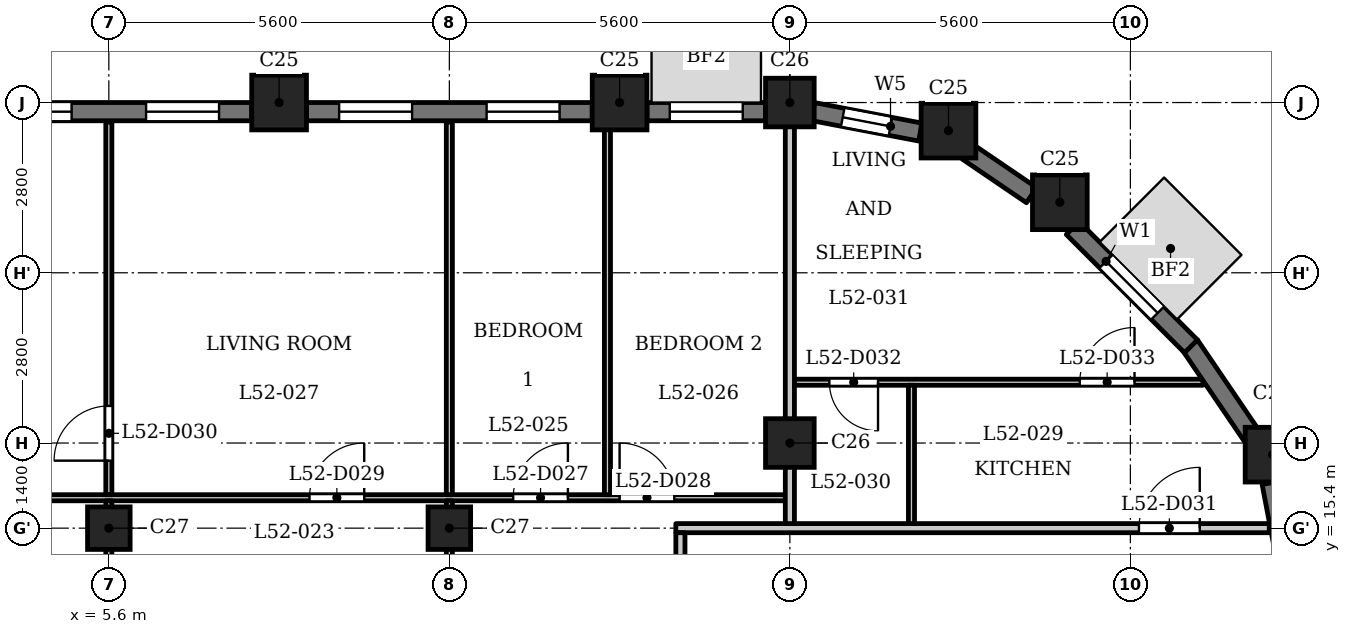
"""IFC4 building model, lengths in metres.
Left out: names, types, materials, properties, quantities, classifications, styles, units other than length and angle.
Written with IfcOpenShell. Run it as: python <this file> out.ifc"""

import sys

from ifc_helpers import new_model, si_unit, direction, frame, frame_2d, origin, origin_2d, place, context, subcontext, project, spatial, rectangle, extrude, element, fill, save


model = new_model("IFC4")
c1 = context("Model", 3, precision=1e-05, world=origin(), true_north=direction((0.0, 1.0)))
c2 = subcontext(c1, "Body", "Model", "MODEL_VIEW")
j1 = project(units=[si_unit("LENGTHUNIT", "METRE"), si_unit("PLANEANGLEUNIT", "RADIAN")], contexts=[c1])
p1 = place(None, origin())
s1 = spatial("IfcSite", under=j1, at=p1, CompositionType="ELEMENT")
p2 = place(p1, origin())
s2 = spatial("IfcBuilding", under=s1, at=p2, CompositionType="ELEMENT")
p3 = place(p2, frame((0.0, 0.0, 202.9)))
s3 = spatial("IfcBuildingStorey", under=s2, at=p3, CompositionType="ELEMENT", Elevation=202.9)
for number, where, z_axis, x_axis in (
    (1, (24.738, 16.609, 0.0), (0.0, 0.0, 1.0), (1.0, 0.0, 0.0)),
    (2, (21.24, 20.76, 0.0), (0.0, 0.0, 1.0), (1.0, 0.0, 0.0)),
    (3, (19.409, 21.938, 0.0), (0.0, 0.0, 1.0), (1.0, 0.0, 0.0)),
    (4, (14.0, 22.4, 0.0), (0.0, 0.0, 1.0), (1.0, 0.0, 0.0)),
    (5, (8.4, 22.4, 0.0), (0.0, 0.0, 1.0), (1.0, 0.0, 0.0)),
):
    element("IfcColumn", number, at=place(p3, frame(where, z_axis=z_axis, x_axis=x_axis)), inside=s3, PredefinedType="COLUMN", context=c2, shape_type="SweptSolid", body=[
        extrude(rectangle(XDim=0.9, YDim=0.9, at=origin_2d()), origin(), (0.0, 0.0, 1.0), 3.5),
    ])
for number, where, z_axis, x_axis in (
    (6, (16.8, 16.8, 0.0), (0.0, 0.0, 1.0), (1.0, 0.0, 0.0)),
    (7, (16.8, 22.4, 0.0), (0.0, 0.0, 1.0), (1.0, 0.0, 0.0)),
):
    element("IfcColumn", number, at=place(p3, frame(where, z_axis=z_axis, x_axis=x_axis)), inside=s3, PredefinedType="COLUMN", context=c2, shape_type="SweptSolid", body=[
        extrude(rectangle(XDim=0.8, YDim=0.8, at=origin_2d()), origin(), (0.0, 0.0, 1.0), 3.5),
    ])
for number, where, z_axis, x_axis in (
    (8, (5.6, 15.4, 0.0), (0.0, 0.0, 1.0), (1.0, 0.0, 0.0)),
    (9, (11.2, 15.4, 0.0), (0.0, 0.0, 1.0), (1.0, 0.0, 0.0)),
):
    element("IfcColumn", number, at=place(p3, frame(where, z_axis=z_axis, x_axis=x_axis)), inside=s3, PredefinedType="COLUMN", context=c2, shape_type="SweptSolid", body=[
        extrude(rectangle(XDim=0.7, YDim=0.7, at=origin_2d()), origin(), (0.0, 0.0, 1.0), 3.5),
    ])
for number, where, z_axis, x_axis in (
    (10, (25.053, 14.372, 0.0), (0.0, 0.0, 1.0), (-0.187, 0.982, 0.0)),
    (11, (24.394, 16.919, 0.0), (0.0, 0.0, 1.0), (-0.562, 0.827, 0.0)),
):
    element("IfcWall", number, at=place(p3, frame(where, z_axis=z_axis, x_axis=x_axis)), inside=s3, PredefinedType="SOLIDWALL", context=c2, shape_type="SweptSolid", body=[
        extrude(rectangle(XDim=1.806, YDim=0.3, at=frame_2d((0.903, 0.0))), origin(), (0.0, 0.0, 1.0), 2.5),
    ])
p4 = place(p3, frame((23.397, 18.391, 0.0), z_axis=(0.0, 0.0, 1.0), x_axis=(-0.707106781187, 0.707106781187, 0.0)))
e12 = element("IfcWall", 12, at=p4, inside=s3, PredefinedType="SOLIDWALL", context=c2, shape_type="SweptSolid", body=[
    extrude(rectangle(XDim=2.75, YDim=0.3, at=frame_2d((1.375, 0.0))), origin(), (0.0, 0.0, 1.0), 2.5),
])
p5 = place(p4, frame((0.775, 0.0, 0.6)))
e13 = element("IfcOpeningElement", 13, at=p5, cuts=e12, PredefinedType="OPENING", context=c2, shape_type="SweptSolid", body=[
    extrude(rectangle(XDim=1.2, YDim=1.55, at=frame_2d((0.6, 0.775))), frame((0.0, 0.16, 0.0), z_axis=(0.0, -1.0, 0.0), x_axis=(1.0, 0.0, 0.0)), (0.0, 0.0, 1.0), 0.32),
])
p6 = place(p3, frame((20.775, 20.876, 0.0), z_axis=(0.0, 0.0, 1.0), x_axis=(-0.827075824828, 0.562090366388, 0.0)))
e14 = element("IfcWall", 14, at=p6, inside=s3, PredefinedType="SOLIDWALL", context=c2, shape_type="SweptSolid", body=[
    extrude(rectangle(XDim=1.277, YDim=0.3, at=frame_2d((0.638, 0.0))), origin(), (0.0, 0.0, 1.0), 2.5),
])
p7 = place(p3, frame((18.946, 21.914, 0.0), z_axis=(0.0, 0.0, 1.0), x_axis=(-0.98230529033, 0.187286722942, 0.0)))
e15 = element("IfcWall", 15, at=p7, inside=s3, PredefinedType="SOLIDWALL", context=c2, shape_type="SweptSolid", body=[
    extrude(rectangle(XDim=1.799, YDim=0.3, at=frame_2d((0.899, 0.0))), origin(), (0.0, 0.0, 1.0), 2.5),
])
p8 = place(p7, frame((0.5, 0.0, 0.6)))
e16 = element("IfcOpeningElement", 16, at=p8, cuts=e15, PredefinedType="OPENING", context=c2, shape_type="SweptSolid", body=[
    extrude(rectangle(XDim=0.8, YDim=1.55, at=frame_2d((0.4, 0.775))), frame((0.0, 0.16, 0.0), z_axis=(0.0, -1.0, 0.0), x_axis=(1.0, 0.0, 0.0)), (0.0, 0.0, 1.0), 0.32),
])
p9 = place(p3, frame((16.4, 22.25, 0.0), z_axis=(0.0, 0.0, 1.0), x_axis=(-1.0, 0.0, 0.0)))
e17 = element("IfcWall", 17, at=p9, inside=s3, PredefinedType="SOLIDWALL", context=c2, shape_type="SweptSolid", body=[
    extrude(rectangle(XDim=1.95, YDim=0.3, at=frame_2d((0.975, 0.0))), origin(), (0.0, 0.0, 1.0), 2.5),
])
p10 = place(p9, frame((0.375, 0.0, 0.6)))
e18 = element("IfcOpeningElement", 18, at=p10, cuts=e17, PredefinedType="OPENING", context=c2, shape_type="SweptSolid", body=[
    extrude(rectangle(XDim=1.2, YDim=1.55, at=frame_2d((0.6, 0.775))), frame((0.0, 0.16, 0.0), z_axis=(0.0, -1.0, 0.0), x_axis=(1.0, 0.0, 0.0)), (0.0, 0.0, 1.0), 0.32),
])
p11 = place(p3, frame((13.55, 22.25, 0.0), z_axis=(0.0, 0.0, 1.0), x_axis=(-1.0, 0.0, 0.0)))
e19 = element("IfcWall", 19, at=p11, inside=s3, PredefinedType="SOLIDWALL", context=c2, shape_type="SweptSolid", body=[
    extrude(rectangle(XDim=4.7, YDim=0.3, at=frame_2d((2.35, 0.0))), origin(), (0.0, 0.0, 1.0), 2.5),
])
p12 = place(p11, frame((0.538, 0.0, 0.6)))
e20 = element("IfcOpeningElement", 20, at=p12, cuts=e19, PredefinedType="OPENING", context=c2, shape_type="SweptSolid", body=[
    extrude(rectangle(XDim=1.2, YDim=1.55, at=frame_2d((0.6, 0.775))), frame((0.0, 0.16, 0.0), z_axis=(0.0, -1.0, 0.0), x_axis=(1.0, 0.0, 0.0)), (0.0, 0.0, 1.0), 0.32),
])
p13 = place(p11, frame((2.962, 0.0, 0.6)))
e21 = element("IfcOpeningElement", 21, at=p13, cuts=e19, PredefinedType="OPENING", context=c2, shape_type="SweptSolid", body=[
    extrude(rectangle(XDim=1.2, YDim=1.55, at=frame_2d((0.6, 0.775))), frame((0.0, 0.16, 0.0), z_axis=(0.0, -1.0, 0.0), x_axis=(1.0, 0.0, 0.0)), (0.0, 0.0, 1.0), 0.32),
])
p14 = place(p3, frame((7.95, 22.25, 0.0), z_axis=(0.0, 0.0, 1.0), x_axis=(-1.0, 0.0, 0.0)))
e22 = element("IfcWall", 22, at=p14, inside=s3, PredefinedType="SOLIDWALL", context=c2, shape_type="SweptSolid", body=[
    extrude(rectangle(XDim=4.7, YDim=0.3, at=frame_2d((2.35, 0.0))), origin(), (0.0, 0.0, 1.0), 2.5),
])
p15 = place(p14, frame((0.538, 0.0, 0.6)))
e23 = element("IfcOpeningElement", 23, at=p15, cuts=e22, PredefinedType="OPENING", context=c2, shape_type="SweptSolid", body=[
    extrude(rectangle(XDim=1.2, YDim=1.55, at=frame_2d((0.6, 0.775))), frame((0.0, 0.16, 0.0), z_axis=(0.0, -1.0, 0.0), x_axis=(1.0, 0.0, 0.0)), (0.0, 0.0, 1.0), 0.32),
])
p16 = place(p14, frame((2.962, 0.0, 0.6)))
e24 = element("IfcOpeningElement", 24, at=p16, cuts=e22, PredefinedType="OPENING", context=c2, shape_type="SweptSolid", body=[
    extrude(rectangle(XDim=1.2, YDim=1.55, at=frame_2d((0.6, 0.775))), frame((0.0, 0.16, 0.0), z_axis=(0.0, -1.0, 0.0), x_axis=(1.0, 0.0, 0.0)), (0.0, 0.0, 1.0), 0.32),
])
p17 = place(p3, frame((14.925, 15.4, 0.0), z_axis=(0.0, 0.0, 1.0), x_axis=(1.0, 0.0, 0.0)))
e25 = element("IfcWall", 25, at=p17, inside=s3, PredefinedType="PARTITIONING", context=c2, shape_type="SweptSolid", body=[
    extrude(rectangle(XDim=9.759, YDim=0.15, at=frame_2d((4.879, 0.0))), origin(), (0.0, 0.0, 1.0), 3.2),
])
p18 = place(p17, frame((7.616, 0.0, 0.0)))
e26 = element("IfcOpeningElement", 26, at=p18, cuts=e25, PredefinedType="OPENING", context=c2, shape_type="SweptSolid", body=[
    extrude(rectangle(XDim=1.0, YDim=2.1, at=frame_2d((0.5, 1.05))), frame((0.0, 0.085, 0.0), z_axis=(0.0, -1.0, 0.0), x_axis=(1.0, 0.0, 0.0)), (0.0, 0.0, 1.0), 0.17),
])
p19 = place(p3, frame((-16.725, 15.9, 0.0), z_axis=(0.0, 0.0, 1.0), x_axis=(1.0, 0.0, 0.0)))
e27 = element("IfcWall", 27, at=p19, inside=s3, PredefinedType="PARTITIONING", context=c2, shape_type="SweptSolid", body=[
    extrude(rectangle(XDim=33.45, YDim=0.1, at=frame_2d((16.725, 0.0))), origin(), (0.0, 0.0, 1.0), 3.2),
])
p20 = place(p19, frame((1.875, 0.0, 0.0)))
e28 = element("IfcOpeningElement", 28, at=p20, cuts=e27, PredefinedType="OPENING", context=c2, shape_type="SweptSolid", body=[
    extrude(rectangle(XDim=0.9, YDim=2.1, at=frame_2d((0.45, 1.05))), frame((0.0, 0.06, 0.0), z_axis=(0.0, -1.0, 0.0), x_axis=(1.0, 0.0, 0.0)), (0.0, 0.0, 1.0), 0.12),
])
p21 = place(p19, frame((3.975, 0.0, 0.0)))
e29 = element("IfcOpeningElement", 29, at=p21, cuts=e27, PredefinedType="OPENING", context=c2, shape_type="SweptSolid", body=[
    extrude(rectangle(XDim=0.9, YDim=2.1, at=frame_2d((0.45, 1.05))), frame((0.0, 0.06, 0.0), z_axis=(0.0, -1.0, 0.0), x_axis=(1.0, 0.0, 0.0)), (0.0, 0.0, 1.0), 0.12),
])
p22 = place(p19, frame((6.825, 0.0, 0.0)))
e30 = element("IfcOpeningElement", 30, at=p22, cuts=e27, PredefinedType="OPENING", context=c2, shape_type="SweptSolid", body=[
    extrude(rectangle(XDim=0.9, YDim=2.1, at=frame_2d((0.45, 1.05))), frame((0.0, 0.06, 0.0), z_axis=(0.0, -1.0, 0.0), x_axis=(1.0, 0.0, 0.0)), (0.0, 0.0, 1.0), 0.12),
])
p23 = place(p19, frame((28.975, 0.0, 0.0)))
e31 = element("IfcOpeningElement", 31, at=p23, cuts=e27, PredefinedType="OPENING", context=c2, shape_type="SweptSolid", body=[
    extrude(rectangle(XDim=0.9, YDim=2.1, at=frame_2d((0.45, 1.05))), frame((0.0, 0.06, 0.0), z_axis=(0.0, -1.0, 0.0), x_axis=(1.0, 0.0, 0.0)), (0.0, 0.0, 1.0), 0.12),
])
p24 = place(p19, frame((30.725, 0.0, 0.0)))
e32 = element("IfcOpeningElement", 32, at=p24, cuts=e27, PredefinedType="OPENING", context=c2, shape_type="SweptSolid", body=[
    extrude(rectangle(XDim=0.9, YDim=2.1, at=frame_2d((0.45, 1.05))), frame((0.0, 0.06, 0.0), z_axis=(0.0, -1.0, 0.0), x_axis=(1.0, 0.0, 0.0)), (0.0, 0.0, 1.0), 0.12),
])
p25 = place(p19, frame((25.625, 0.0, 0.0)))
e33 = element("IfcOpeningElement", 33, at=p25, cuts=e27, PredefinedType="OPENING", context=c2, shape_type="SweptSolid", body=[
    extrude(rectangle(XDim=0.9, YDim=2.1, at=frame_2d((0.45, 1.05))), frame((0.0, 0.06, 0.0), z_axis=(0.0, -1.0, 0.0), x_axis=(1.0, 0.0, 0.0)), (0.0, 0.0, 1.0), 0.12),
])
p26 = place(p3, frame((16.875, 17.8, 0.0), z_axis=(0.0, 0.0, 1.0), x_axis=(1.0, 0.0, 0.0)))
e34 = element("IfcWall", 34, at=p26, inside=s3, PredefinedType="PARTITIONING", context=c2, shape_type="SweptSolid", body=[
    extrude(rectangle(XDim=6.719, YDim=0.1, at=frame_2d((3.359, 0.0))), origin(), (0.0, 0.0, 1.0), 3.2),
])
p27 = place(p26, frame((0.575, 0.0, 0.0)))
e35 = element("IfcOpeningElement", 35, at=p27, cuts=e34, PredefinedType="OPENING", context=c2, shape_type="SweptSolid", body=[
    extrude(rectangle(XDim=0.8, YDim=2.1, at=frame_2d((0.4, 1.05))), frame((0.0, 0.06, 0.0), z_axis=(0.0, -1.0, 0.0), x_axis=(1.0, 0.0, 0.0)), (0.0, 0.0, 1.0), 0.12),
])
p28 = place(p26, frame((4.693, 0.0, 0.0)))
e36 = element("IfcOpeningElement", 36, at=p28, cuts=e34, PredefinedType="OPENING", context=c2, shape_type="SweptSolid", body=[
    extrude(rectangle(XDim=0.9, YDim=2.1, at=frame_2d((0.45, 1.05))), frame((0.0, 0.06, 0.0), z_axis=(0.0, -1.0, 0.0), x_axis=(1.0, 0.0, 0.0)), (0.0, 0.0, 1.0), 0.12),
])
p29 = place(p3, frame((5.6, 13.275, 0.0), z_axis=(0.0, 0.0, 1.0), x_axis=(0.0, 1.0, 0.0)))
e37 = element("IfcWall", 37, at=p29, inside=s3, PredefinedType="PARTITIONING", context=c2, shape_type="SweptSolid", body=[
    extrude(rectangle(XDim=2.575, YDim=0.1, at=frame_2d((1.288, 0.0))), origin(), (0.0, 0.0, 1.0), 3.2),
])
p30 = place(p29, frame((0.425, 0.0, 0.0)))
e38 = element("IfcOpeningElement", 38, at=p30, cuts=e37, PredefinedType="OPENING", context=c2, shape_type="SweptSolid", body=[
    extrude(rectangle(XDim=0.8, YDim=2.1, at=frame_2d((0.4, 1.05))), frame((0.0, 0.06, 0.0), z_axis=(0.0, -1.0, 0.0), x_axis=(1.0, 0.0, 0.0)), (0.0, 0.0, 1.0), 0.12),
])
p31 = place(p3, frame((5.6, 15.95, 0.0), z_axis=(0.0, 0.0, 1.0), x_axis=(0.0, 1.0, 0.0)))
e39 = element("IfcWall", 39, at=p31, inside=s3, PredefinedType="PARTITIONING", context=c2, shape_type="SweptSolid", body=[
    extrude(rectangle(XDim=6.13, YDim=0.1, at=frame_2d((3.065, 0.0))), origin(), (0.0, 0.0, 1.0), 3.2),
])
p32 = place(p31, frame((0.56, 0.0, 0.0)))
e40 = element("IfcOpeningElement", 40, at=p32, cuts=e39, PredefinedType="OPENING", context=c2, shape_type="SweptSolid", body=[
    extrude(rectangle(XDim=0.9, YDim=2.1, at=frame_2d((0.45, 1.05))), frame((0.0, 0.06, 0.0), z_axis=(0.0, -1.0, 0.0), x_axis=(1.0, 0.0, 0.0)), (0.0, 0.0, 1.0), 0.12),
])
p33 = place(p3, frame((11.2, 13.275, 0.0), z_axis=(0.0, 0.0, 1.0), x_axis=(0.0, 1.0, 0.0)))
e41 = element("IfcWall", 41, at=p33, inside=s3, PredefinedType="PARTITIONING", context=c2, shape_type="SweptSolid", body=[
    extrude(rectangle(XDim=2.575, YDim=0.1, at=frame_2d((1.288, 0.0))), origin(), (0.0, 0.0, 1.0), 3.2),
])
p34 = place(p33, frame((0.575, 0.0, 0.0)))
e42 = element("IfcOpeningElement", 42, at=p34, cuts=e41, PredefinedType="OPENING", context=c2, shape_type="SweptSolid", body=[
    extrude(rectangle(XDim=0.9, YDim=2.1, at=frame_2d((0.45, 1.05))), frame((0.0, 0.06, 0.0), z_axis=(0.0, -1.0, 0.0), x_axis=(1.0, 0.0, 0.0)), (0.0, 0.0, 1.0), 0.12),
])
p35 = place(p3, frame((11.2, 15.95, 0.0), z_axis=(0.0, 0.0, 1.0), x_axis=(0.0, 1.0, 0.0)))
e43 = element("IfcWall", 43, at=p35, inside=s3, PredefinedType="PARTITIONING", context=c2, shape_type="SweptSolid", body=[
    extrude(rectangle(XDim=6.13, YDim=0.1, at=frame_2d((3.065, 0.0))), origin(), (0.0, 0.0, 1.0), 3.2),
])
p36 = place(p3, frame((13.8, 15.95, 0.0), z_axis=(0.0, 0.0, 1.0), x_axis=(0.0, 1.0, 0.0)))
e44 = element("IfcWall", 44, at=p36, inside=s3, PredefinedType="PARTITIONING", context=c2, shape_type="SweptSolid", body=[
    extrude(rectangle(XDim=6.88, YDim=0.1, at=frame_2d((3.44, 0.0))), origin(), (0.0, 0.0, 1.0), 3.2),
])
p37 = place(p3, frame((15.0, 13.275, 0.0), z_axis=(0.0, 0.0, 1.0), x_axis=(0.0, 1.0, 0.0)))
e45 = element("IfcWall", 45, at=p37, inside=s3, PredefinedType="PARTITIONING", context=c2, shape_type="SweptSolid", body=[
    extrude(rectangle(XDim=2.05, YDim=0.15, at=frame_2d((1.025, 0.0))), origin(), (0.0, 0.0, 1.0), 3.2),
])
p38 = place(p37, frame((0.476, 0.0, 0.0)))
e46 = element("IfcOpeningElement", 46, at=p38, cuts=e45, PredefinedType="OPENING", context=c2, shape_type="SweptSolid", body=[
    extrude(rectangle(XDim=1.0, YDim=2.1, at=frame_2d((0.5, 1.05))), frame((0.0, 0.085, 0.0), z_axis=(0.0, -1.0, 0.0), x_axis=(1.0, 0.0, 0.0)), (0.0, 0.0, 1.0), 0.17),
])
p39 = place(p3, frame((16.8, 15.475, 0.0), z_axis=(0.0, 0.0, 1.0), x_axis=(0.0, 1.0, 0.0)))
e47 = element("IfcWall", 47, at=p39, inside=s3, PredefinedType="PARTITIONING", context=c2, shape_type="SweptSolid", body=[
    extrude(rectangle(XDim=6.835, YDim=0.15, at=frame_2d((3.417, 0.0))), origin(), (0.0, 0.0, 1.0), 2.55),
])
p40 = place(p3, frame((18.8, 15.475, 0.0), z_axis=(0.0, 0.0, 1.0), x_axis=(0.0, 1.0, 0.0)))
e48 = element("IfcWall", 48, at=p40, inside=s3, PredefinedType="PARTITIONING", context=c2, shape_type="SweptSolid", body=[
    extrude(rectangle(XDim=2.275, YDim=0.1, at=frame_2d((1.137, 0.0))), origin(), (0.0, 0.0, 1.0), 3.2),
])
p41 = place(p23, origin())
e49 = element("IfcDoor", 49, at=p41, inside=s3, OperationType="SINGLE_SWING_LEFT", PredefinedType="DOOR", context=c2, shape_type="SweptSolid", body=[
    extrude(rectangle(XDim=0.9, YDim=2.1, at=frame_2d((0.45, 1.05))), frame((0.0, 0.025, 0.0), z_axis=(0.0, -1.0, 0.0), x_axis=(1.0, 0.0, 0.0)), (0.0, 0.0, 1.0), 0.05),
])
fill(e31, e49)
p42 = place(p24, origin())
e50 = element("IfcDoor", 50, at=p42, inside=s3, OperationType="SINGLE_SWING_RIGHT", PredefinedType="DOOR", context=c2, shape_type="SweptSolid", body=[
    extrude(rectangle(XDim=0.9, YDim=2.1, at=frame_2d((0.45, 1.05))), frame((0.0, 0.025, 0.0), z_axis=(0.0, -1.0, 0.0), x_axis=(1.0, 0.0, 0.0)), (0.0, 0.0, 1.0), 0.05),
])
fill(e32, e50)
p43 = place(p25, origin())
e51 = element("IfcDoor", 51, at=p43, inside=s3, OperationType="SINGLE_SWING_LEFT", PredefinedType="DOOR", context=c2, shape_type="SweptSolid", body=[
    extrude(rectangle(XDim=0.9, YDim=2.1, at=frame_2d((0.45, 1.05))), frame((0.0, 0.025, 0.0), z_axis=(0.0, -1.0, 0.0), x_axis=(1.0, 0.0, 0.0)), (0.0, 0.0, 1.0), 0.05),
])
fill(e33, e51)
p44 = place(p32, origin())
e52 = element("IfcDoor", 52, at=p44, inside=s3, OperationType="SINGLE_SWING_RIGHT", PredefinedType="DOOR", context=c2, shape_type="SweptSolid", body=[
    extrude(rectangle(XDim=0.9, YDim=2.1, at=frame_2d((0.45, 1.05))), frame((0.0, 0.025, 0.0), z_axis=(0.0, -1.0, 0.0), x_axis=(1.0, 0.0, 0.0)), (0.0, 0.0, 1.0), 0.05),
])
fill(e40, e52)
p45 = place(p18, origin())
e53 = element("IfcDoor", 53, at=p45, inside=s3, OperationType="SINGLE_SWING_LEFT", PredefinedType="DOOR", context=c2, shape_type="SweptSolid", body=[
    extrude(rectangle(XDim=1.0, YDim=2.1, at=frame_2d((0.5, 1.05))), frame((0.0, 0.025, 0.0), z_axis=(0.0, -1.0, 0.0), x_axis=(1.0, 0.0, 0.0)), (0.0, 0.0, 1.0), 0.05),
])
fill(e26, e53)
p46 = place(p27, origin())
e54 = element("IfcDoor", 54, at=p46, inside=s3, OperationType="SINGLE_SWING_RIGHT", PredefinedType="DOOR", context=c2, shape_type="SweptSolid", body=[
    extrude(rectangle(XDim=0.8, YDim=2.1, at=frame_2d((0.4, 1.05))), frame((0.0, 0.025, 0.0), z_axis=(0.0, -1.0, 0.0), x_axis=(1.0, 0.0, 0.0)), (0.0, 0.0, 1.0), 0.05),
])
fill(e35, e54)
p47 = place(p28, origin())
e55 = element("IfcDoor", 55, at=p47, inside=s3, OperationType="SINGLE_SWING_LEFT", PredefinedType="DOOR", context=c2, shape_type="SweptSolid", body=[
    extrude(rectangle(XDim=0.9, YDim=2.1, at=frame_2d((0.45, 1.05))), frame((0.0, 0.025, 0.0), z_axis=(0.0, -1.0, 0.0), x_axis=(1.0, 0.0, 0.0)), (0.0, 0.0, 1.0), 0.05),
])
fill(e36, e55)
p48 = place(p5, origin())
e56 = element("IfcWindow", 56, at=p48, inside=s3, PartitioningType="SINGLE_PANEL", PredefinedType="WINDOW", context=c2, shape_type="SweptSolid", body=[
    extrude(rectangle(XDim=1.2, YDim=1.55, at=frame_2d((0.6, 0.775))), frame((0.0, 0.03, 0.0), z_axis=(0.0, -1.0, 0.0), x_axis=(1.0, 0.0, 0.0)), (0.0, 0.0, 1.0), 0.06),
])
fill(e13, e56)
p49 = place(p8, origin())
e57 = element("IfcWindow", 57, at=p49, inside=s3, PartitioningType="SINGLE_PANEL", PredefinedType="WINDOW", context=c2, shape_type="SweptSolid", body=[
    extrude(rectangle(XDim=0.8, YDim=1.55, at=frame_2d((0.4, 0.775))), frame((0.0, 0.03, 0.0), z_axis=(0.0, -1.0, 0.0), x_axis=(1.0, 0.0, 0.0)), (0.0, 0.0, 1.0), 0.06),
])
fill(e16, e57)
p50 = place(p10, origin())
e58 = element("IfcWindow", 58, at=p50, inside=s3, PartitioningType="SINGLE_PANEL", PredefinedType="WINDOW", context=c2, shape_type="SweptSolid", body=[
    extrude(rectangle(XDim=1.2, YDim=1.55, at=frame_2d((0.6, 0.775))), frame((0.0, 0.03, 0.0), z_axis=(0.0, -1.0, 0.0), x_axis=(1.0, 0.0, 0.0)), (0.0, 0.0, 1.0), 0.06),
])
fill(e18, e58)
p51 = place(p12, origin())
e59 = element("IfcWindow", 59, at=p51, inside=s3, PartitioningType="SINGLE_PANEL", PredefinedType="WINDOW", context=c2, shape_type="SweptSolid", body=[
    extrude(rectangle(XDim=1.2, YDim=1.55, at=frame_2d((0.6, 0.775))), frame((0.0, 0.03, 0.0), z_axis=(0.0, -1.0, 0.0), x_axis=(1.0, 0.0, 0.0)), (0.0, 0.0, 1.0), 0.06),
])
fill(e20, e59)
p52 = place(p13, origin())
e60 = element("IfcWindow", 60, at=p52, inside=s3, PartitioningType="SINGLE_PANEL", PredefinedType="WINDOW", context=c2, shape_type="SweptSolid", body=[
    extrude(rectangle(XDim=1.2, YDim=1.55, at=frame_2d((0.6, 0.775))), frame((0.0, 0.03, 0.0), z_axis=(0.0, -1.0, 0.0), x_axis=(1.0, 0.0, 0.0)), (0.0, 0.0, 1.0), 0.06),
])
fill(e21, e60)
p53 = place(p15, origin())
e61 = element("IfcWindow", 61, at=p53, inside=s3, PartitioningType="SINGLE_PANEL", PredefinedType="WINDOW", context=c2, shape_type="SweptSolid", body=[
    extrude(rectangle(XDim=1.2, YDim=1.55, at=frame_2d((0.6, 0.775))), frame((0.0, 0.03, 0.0), z_axis=(0.0, -1.0, 0.0), x_axis=(1.0, 0.0, 0.0)), (0.0, 0.0, 1.0), 0.06),
])
fill(e23, e61)
p54 = place(p16, origin())
e62 = element("IfcWindow", 62, at=p54, inside=s3, PartitioningType="SINGLE_PANEL", PredefinedType="WINDOW", context=c2, shape_type="SweptSolid", body=[
    extrude(rectangle(XDim=1.2, YDim=1.55, at=frame_2d((0.6, 0.775))), frame((0.0, 0.03, 0.0), z_axis=(0.0, -1.0, 0.0), x_axis=(1.0, 0.0, 0.0)), (0.0, 0.0, 1.0), 0.06),
])
fill(e24, e62)
save(model, sys.argv[1])
